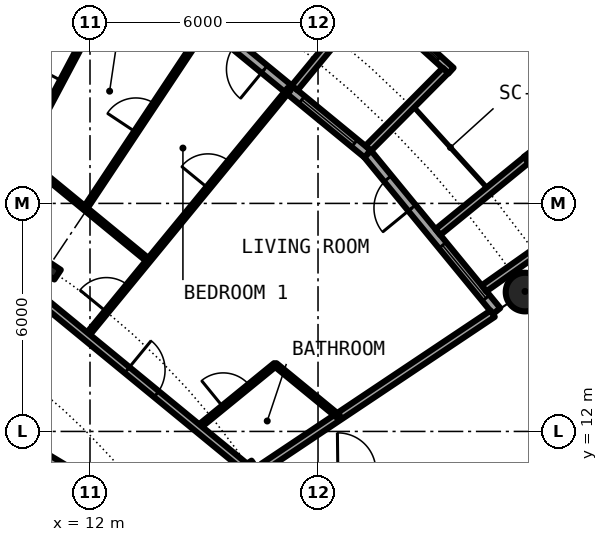
"""IFC4 building model, lengths in metres.
Left out: names, types, materials, properties, quantities, classifications, styles, units other than length and angle.
Written with IfcOpenShell. Run it as: python <this file> out.ifc"""

import sys

from ifc_helpers import new_model, si_unit, direction, frame, frame_2d, origin, origin_2d, place, context, subcontext, project, spatial, rectangle, circle, hollow_circle, i_section, extrude, element, fill, save


model = new_model("IFC4")
c1 = context("Model", 3, precision=1e-05, world=origin(), true_north=direction((0.0, 1.0)))
c2 = subcontext(c1, "Body", "Model", "MODEL_VIEW")
j1 = project(units=[si_unit("LENGTHUNIT", "METRE"), si_unit("PLANEANGLEUNIT", "RADIAN")], contexts=[c1])
p1 = place(None, origin())
s1 = spatial("IfcSite", under=j1, at=p1, CompositionType="ELEMENT")
p2 = place(p1, origin())
s2 = spatial("IfcBuilding", under=s1, at=p2, CompositionType="ELEMENT")
p3 = place(p2, frame((0.0, 0.0, 47.2)))
s3 = spatial("IfcBuildingStorey", under=s2, at=p3, CompositionType="ELEMENT", Elevation=47.2)
p4 = place(p3, frame((23.448, 15.667, 0.0), z_axis=(0.0, 0.0, 1.0), x_axis=(1.0, 0.0, 0.0)))
e1 = element("IfcColumn", 1, at=p4, inside=s3, PredefinedType="COLUMN", context=c2, shape_type="SweptSolid", body=[
    extrude(hollow_circle(Radius=0.508, WallThickness=0.05, at=origin_2d()), origin(), (0.0, 0.0, 1.0), 3.05),
])
for number, where, z_axis, x_axis in (
    (2, (16.297, 10.889, 0.0), (0.0, 0.0, 1.0), (0.831, 0.556, 0.0)),
    (3, (10.889, 16.297, 0.0), (0.0, 0.0, 1.0), (0.556, 0.831, 0.0)),
):
    element("IfcColumn", number, at=place(p3, frame(where, z_axis=z_axis, x_axis=x_axis)), inside=s3, PredefinedType="COLUMN", context=c2, shape_type="SweptSolid", body=[
        extrude(i_section(OverallWidth=0.305, OverallDepth=0.62, WebThickness=0.021, FlangeThickness=0.04, FilletRadius=0.027, at=origin_2d()), origin(), (0.0, 0.0, 1.0), 3.05),
    ])
p5 = place(p3, frame((22.699, 15.167, 0.0), z_axis=(0.0, 0.0, 1.0), x_axis=(-0.634382322723, 0.773019449054, 0.0)))
e4 = element("IfcWall", 4, at=p5, inside=s3, PredefinedType="SOLIDWALL", context=c2, shape_type="SweptSolid", body=[
    extrude(rectangle(XDim=5.352, YDim=0.25, at=frame_2d((2.676, 0.0))), origin(), (0.0, 0.0, 1.0), 2.7),
])
p6 = place(p5, frame((0.441, 0.0, 0.3)))
e5 = element("IfcOpeningElement", 5, at=p6, cuts=e4, PredefinedType="OPENING", context=c2, shape_type="SweptSolid", body=[
    extrude(rectangle(XDim=1.8, YDim=2.1, at=frame_2d((0.9, 1.05))), frame((0.0, 0.135, 0.0), z_axis=(0.0, -1.0, 0.0), x_axis=(1.0, 0.0, 0.0)), (0.0, 0.0, 1.0), 0.27),
])
p7 = place(p5, frame((3.51, 0.0, 0.0)))
e6 = element("IfcOpeningElement", 6, at=p7, cuts=e4, PredefinedType="OPENING", context=c2, shape_type="SweptSolid", body=[
    extrude(rectangle(XDim=1.0, YDim=2.2, at=frame_2d((0.5, 1.1))), frame((0.0, 0.135, 0.0), z_axis=(0.0, -1.0, 0.0), x_axis=(1.0, 0.0, 0.0)), (0.0, 0.0, 1.0), 0.27),
])
p8 = place(p3, frame((24.909, 17.427, -0.03), z_axis=(0.0, 0.0, 1.0), x_axis=(-0.60418752353, 0.796842165306, 0.0)))
e7 = element("IfcWall", 7, at=p8, inside=s3, PredefinedType="SOLIDWALL", context=c2, shape_type="SweptSolid", body=[
    extrude(rectangle(XDim=2.337, YDim=0.2, at=frame_2d((1.168, 0.0))), origin(), (0.0, 0.0, 1.0), 2.73),
])
p9 = place(p8, frame((0.128, 0.0, 0.33)))
e8 = element("IfcOpeningElement", 8, at=p9, cuts=e7, PredefinedType="OPENING", context=c2, shape_type="SweptSolid", body=[
    extrude(circle(Radius=1.04, at=frame_2d((1.04, 1.04))), frame((0.0, 0.11, 0.0), z_axis=(0.0, -1.0, 0.0), x_axis=(1.0, 0.0, 0.0)), (0.0, 0.0, 1.0), 0.22),
])
p10 = place(p3, frame((22.37, 15.765, -0.03), z_axis=(0.0, 0.0, 1.0), x_axis=(0.817256123454, 0.576274612209, 0.0)))
e9 = element("IfcWall", 9, at=p10, inside=s3, PredefinedType="SOLIDWALL", context=c2, shape_type="SweptSolid", body=[
    extrude(rectangle(XDim=2.933, YDim=0.2, at=frame_2d((1.466, 0.0))), origin(), (0.0, 0.0, 1.0), 2.73),
])
p11 = place(p3, frame((21.155, 17.246, -0.03), z_axis=(0.0, 0.0, 1.0), x_axis=(0.775179004516, 0.631741648902, 0.0)))
e10 = element("IfcWall", 10, at=p11, inside=s3, PredefinedType="SOLIDWALL", context=c2, shape_type="SweptSolid", body=[
    extrude(rectangle(XDim=3.006, YDim=0.2, at=frame_2d((1.503, 0.0))), origin(), (0.0, 0.0, 1.0), 2.73),
])
p12 = place(p3, frame((19.304, 19.304, 0.0), z_axis=(0.0, 0.0, 1.0), x_axis=(-0.773019449054, 0.634382322723, 0.0)))
e11 = element("IfcWall", 11, at=p12, inside=s3, PredefinedType="SOLIDWALL", context=c2, shape_type="SweptSolid", body=[
    extrude(rectangle(XDim=5.352, YDim=0.25, at=frame_2d((2.676, 0.0))), origin(), (0.0, 0.0, 1.0), 2.7),
])
p13 = place(p12, frame((0.441, 0.0, 0.3)))
e12 = element("IfcOpeningElement", 12, at=p13, cuts=e11, PredefinedType="OPENING", context=c2, shape_type="SweptSolid", body=[
    extrude(rectangle(XDim=1.8, YDim=2.1, at=frame_2d((0.9, 1.05))), frame((0.0, 0.135, 0.0), z_axis=(0.0, -1.0, 0.0), x_axis=(1.0, 0.0, 0.0)), (0.0, 0.0, 1.0), 0.27),
])
p14 = place(p12, frame((3.51, 0.0, 0.0)))
e13 = element("IfcOpeningElement", 13, at=p14, cuts=e11, PredefinedType="OPENING", context=c2, shape_type="SweptSolid", body=[
    extrude(rectangle(XDim=1.0, YDim=2.2, at=frame_2d((0.5, 1.1))), frame((0.0, 0.135, 0.0), z_axis=(0.0, -1.0, 0.0), x_axis=(1.0, 0.0, 0.0)), (0.0, 0.0, 1.0), 0.27),
])
p15 = place(p3, frame((21.5, 21.493, -0.03), z_axis=(0.0, 0.0, 1.0), x_axis=(-0.740998365753, 0.671506829416, 0.0)))
e14 = element("IfcWall", 14, at=p15, inside=s3, PredefinedType="SOLIDWALL", context=c2, shape_type="SweptSolid", body=[
    extrude(rectangle(XDim=2.993, YDim=0.2, at=frame_2d((1.497, 0.0))), origin(), (0.0, 0.0, 1.0), 2.73),
])
p16 = place(p15, frame((0.457, 0.0, 0.33)))
e15 = element("IfcOpeningElement", 15, at=p16, cuts=e14, PredefinedType="OPENING", context=c2, shape_type="SweptSolid", body=[
    extrude(circle(Radius=1.04, at=frame_2d((1.04, 1.04))), frame((0.0, 0.11, 0.0), z_axis=(0.0, -1.0, 0.0), x_axis=(1.0, 0.0, 0.0)), (0.0, 0.0, 1.0), 0.22),
])
p17 = place(p3, frame((19.323, 19.45, -0.03), z_axis=(0.0, 0.0, 1.0), x_axis=(0.704476739375, 0.709727076896, 0.0)))
e16 = element("IfcWall", 16, at=p17, inside=s3, PredefinedType="SOLIDWALL", context=c2, shape_type="SweptSolid", body=[
    extrude(rectangle(XDim=2.883, YDim=0.2, at=frame_2d((1.441, 0.0))), origin(), (0.0, 0.0, 1.0), 2.73),
])
p18 = place(p3, frame((17.384, 21.041, -0.03), z_axis=(0.0, 0.0, 1.0), x_axis=(0.63709551667, 0.770784861449, 0.0)))
e17 = element("IfcWall", 17, at=p18, inside=s3, PredefinedType="SOLIDWALL", context=c2, shape_type="SweptSolid", body=[
    extrude(rectangle(XDim=3.006, YDim=0.2, at=frame_2d((1.503, 0.0))), origin(), (0.0, 0.0, 1.0), 2.73),
])
p19 = place(p3, frame((10.202, 19.234, 0.0), z_axis=(0.0, 0.0, 1.0), x_axis=(0.468610030042, 0.883405139075, 0.0)))
e18 = element("IfcWall", 18, at=p19, inside=s3, PredefinedType="PARTITIONING", context=c2, shape_type="SweptSolid", body=[
    extrude(rectangle(XDim=5.403, YDim=0.1, at=frame_2d((2.702, 0.0))), origin(), (0.0, 0.0, 1.0), 2.7),
])
p20 = place(p19, frame((2.252, 0.0, 0.0)))
e19 = element("IfcOpeningElement", 19, at=p20, cuts=e18, PredefinedType="OPENING", context=c2, shape_type="SweptSolid", body=[
    extrude(rectangle(XDim=0.9, YDim=2.3, at=frame_2d((0.45, 1.15))), frame((0.0, 0.06, 0.0), z_axis=(0.0, -1.0, 0.0), x_axis=(1.0, 0.0, 0.0)), (0.0, 0.0, 1.0), 0.12),
])
p21 = place(p3, frame((11.87, 17.865, 0.0), z_axis=(0.0, 0.0, 1.0), x_axis=(0.553440102418, 0.832888980018, 0.0)))
e20 = element("IfcWall", 20, at=p21, inside=s3, PredefinedType="PARTITIONING", context=c2, shape_type="SweptSolid", body=[
    extrude(rectangle(XDim=5.726, YDim=0.1, at=frame_2d((2.863, 0.0))), origin(), (0.0, 0.0, 1.0), 2.7),
])
p22 = place(p21, frame((2.413, 0.0, 0.0)))
e21 = element("IfcOpeningElement", 21, at=p22, cuts=e20, PredefinedType="OPENING", context=c2, shape_type="SweptSolid", body=[
    extrude(rectangle(XDim=0.9, YDim=2.3, at=frame_2d((0.45, 1.15))), frame((0.0, 0.06, 0.0), z_axis=(0.0, -1.0, 0.0), x_axis=(1.0, 0.0, 0.0)), (0.0, 0.0, 1.0), 0.12),
])
p23 = place(p3, frame((11.899, 14.499, 0.0), z_axis=(0.0, 0.0, 1.0), x_axis=(0.634396151441, 0.77300810024, 0.0)))
e22 = element("IfcWall", 22, at=p23, inside=s3, PredefinedType="PARTITIONING", context=c2, shape_type="SweptSolid", body=[
    extrude(rectangle(XDim=8.419, YDim=0.1, at=frame_2d((4.209, 0.0))), origin(), (0.0, 0.0, 1.0), 2.7),
])
p24 = place(p23, frame((0.84, 0.0, 0.0)))
e23 = element("IfcOpeningElement", 23, at=p24, cuts=e22, PredefinedType="OPENING", context=c2, shape_type="SweptSolid", body=[
    extrude(rectangle(XDim=0.9, YDim=2.3, at=frame_2d((0.45, 1.15))), frame((0.0, 0.06, 0.0), z_axis=(0.0, -1.0, 0.0), x_axis=(1.0, 0.0, 0.0)), (0.0, 0.0, 1.0), 0.12),
])
p25 = place(p23, frame((5.051, 0.0, 0.0)))
e24 = element("IfcOpeningElement", 24, at=p25, cuts=e22, PredefinedType="OPENING", context=c2, shape_type="SweptSolid", body=[
    extrude(rectangle(XDim=0.9, YDim=2.3, at=frame_2d((0.45, 1.15))), frame((0.0, 0.06, 0.0), z_axis=(0.0, -1.0, 0.0), x_axis=(1.0, 0.0, 0.0)), (0.0, 0.0, 1.0), 0.12),
])
p26 = place(p3, frame((14.831, 12.092, 0.0), z_axis=(0.0, 0.0, 1.0), x_axis=(0.774979608522, 0.631986239072, 0.0)))
e25 = element("IfcWall", 25, at=p26, inside=s3, PredefinedType="PARTITIONING", context=c2, shape_type="SweptSolid", body=[
    extrude(rectangle(XDim=2.636, YDim=0.1, at=frame_2d((1.318, 0.0))), origin(), (0.0, 0.0, 1.0), 2.7),
])
p27 = place(p26, frame((0.868, 0.0, 0.0)))
e26 = element("IfcOpeningElement", 26, at=p27, cuts=e25, PredefinedType="OPENING", context=c2, shape_type="SweptSolid", body=[
    extrude(rectangle(XDim=0.9, YDim=2.3, at=frame_2d((0.45, 1.15))), frame((0.0, 0.06, 0.0), z_axis=(0.0, -1.0, 0.0), x_axis=(1.0, 0.0, 0.0)), (0.0, 0.0, 1.0), 0.12),
])
p28 = place(p3, frame((16.555, 11.061, 0.0), z_axis=(0.0, 0.0, 1.0), x_axis=(0.831403467378, 0.55566921314, 0.0)))
e27 = element("IfcWall", 27, at=p28, inside=s3, PredefinedType="PARTITIONING", context=c2, shape_type="SweptSolid", body=[
    extrude(rectangle(XDim=7.265, YDim=0.2, at=frame_2d((3.632, 0.0))), origin(), (0.0, 0.0, 1.0), 2.7),
])
p29 = place(p3, frame((1.658, 16.819, 0.0), z_axis=(0.0, 0.0, 1.0), x_axis=(0.857688434449, -0.514169767113, 0.0)))
e28 = element("IfcWall", 28, at=p29, inside=s3, PredefinedType="PARTITIONING", context=c2, shape_type="SweptSolid", body=[
    extrude(rectangle(XDim=14.429, YDim=0.2, at=frame_2d((7.215, 0.0))), origin(), (0.0, 0.0, 1.0), 2.7),
])
p30 = place(p29, frame((4.316, 0.0, 0.0)))
e29 = element("IfcOpeningElement", 29, at=p30, cuts=e28, PredefinedType="OPENING", context=c2, shape_type="SweptSolid", body=[
    extrude(rectangle(XDim=1.0, YDim=2.3, at=frame_2d((0.5, 1.15))), frame((0.0, 0.11, 0.0), z_axis=(0.0, -1.0, 0.0), x_axis=(1.0, 0.0, 0.0)), (0.0, 0.0, 1.0), 0.22),
])
p31 = place(p3, frame((7.5, 18.108, 0.0), z_axis=(0.0, 0.0, 1.0), x_axis=(0.773041360816, -0.634355621452, 0.0)))
e30 = element("IfcWall", 30, at=p31, inside=s3, PredefinedType="PARTITIONING", context=c2, shape_type="SweptSolid", body=[
    extrude(rectangle(XDim=11.221, YDim=0.2, at=frame_2d((5.61, 0.0))), origin(), (0.0, 0.0, 1.0), 2.38),
])
p32 = place(p31, frame((7.083, 0.0, 0.0)))
e31 = element("IfcOpeningElement", 31, at=p32, cuts=e30, PredefinedType="OPENING", context=c2, shape_type="SweptSolid", body=[
    extrude(rectangle(XDim=1.0, YDim=2.3, at=frame_2d((0.5, 1.15))), frame((0.0, 0.11, 0.0), z_axis=(0.0, -1.0, 0.0), x_axis=(1.0, 0.0, 0.0)), (0.0, 0.0, 1.0), 0.22),
])
p33 = place(p3, frame((8.534, 20.603, 0.0), z_axis=(0.0, 0.0, 1.0), x_axis=(0.773000340237, -0.634405606843, 0.0)))
e32 = element("IfcWall", 32, at=p33, inside=s3, PredefinedType="PARTITIONING", context=c2, shape_type="SweptSolid", body=[
    extrude(rectangle(XDim=6.474, YDim=0.1, at=frame_2d((3.237, 0.0))), origin(), (0.0, 0.0, 1.0), 2.7),
])
p34 = place(p3, frame((16.874, 13.758, 0.0), z_axis=(0.0, 0.0, 1.0), x_axis=(0.772948171844, -0.634469166818, 0.0)))
e33 = element("IfcWall", 33, at=p34, inside=s3, PredefinedType="PARTITIONING", context=c2, shape_type="SweptSolid", body=[
    extrude(rectangle(XDim=2.158, YDim=0.1, at=frame_2d((1.079, 0.0))), origin(), (0.0, 0.0, 1.0), 2.7),
])
p35 = place(p6, origin())
e34 = element("IfcWindow", 34, at=p35, inside=s3, PartitioningType="SINGLE_PANEL", PredefinedType="WINDOW", context=c2, shape_type="SweptSolid", body=[
    extrude(rectangle(XDim=1.8, YDim=2.1, at=frame_2d((0.9, 1.05))), frame((0.0, 0.03, 0.0), z_axis=(0.0, -1.0, 0.0), x_axis=(1.0, 0.0, 0.0)), (0.0, 0.0, 1.0), 0.06),
])
fill(e5, e34)
p36 = place(p7, origin())
e35 = element("IfcDoor", 35, at=p36, inside=s3, OperationType="SINGLE_SWING_LEFT", PredefinedType="DOOR", context=c2, shape_type="SweptSolid", body=[
    extrude(rectangle(XDim=1.0, YDim=2.2, at=frame_2d((0.5, 1.1))), frame((0.0, 0.025, 0.0), z_axis=(0.0, -1.0, 0.0), x_axis=(1.0, 0.0, 0.0)), (0.0, 0.0, 1.0), 0.05),
])
fill(e6, e35)
p37 = place(p13, origin())
e36 = element("IfcWindow", 36, at=p37, inside=s3, PartitioningType="SINGLE_PANEL", PredefinedType="WINDOW", context=c2, shape_type="SweptSolid", body=[
    extrude(rectangle(XDim=1.8, YDim=2.1, at=frame_2d((0.9, 1.05))), frame((0.0, 0.03, 0.0), z_axis=(0.0, -1.0, 0.0), x_axis=(1.0, 0.0, 0.0)), (0.0, 0.0, 1.0), 0.06),
])
fill(e12, e36)
p38 = place(p16, origin())
e37 = element("IfcWindow", 37, at=p38, inside=s3, PartitioningType="SINGLE_PANEL", PredefinedType="WINDOW", context=c2, shape_type="SweptSolid", body=[
    extrude(circle(Radius=1.04, at=frame_2d((1.04, 1.04))), frame((0.0, 0.03, 0.0), z_axis=(0.0, -1.0, 0.0), x_axis=(1.0, 0.0, 0.0)), (0.0, 0.0, 1.0), 0.06),
])
fill(e15, e37)
p39 = place(p14, origin())
e38 = element("IfcDoor", 38, at=p39, inside=s3, OperationType="SINGLE_SWING_LEFT", PredefinedType="DOOR", context=c2, shape_type="SweptSolid", body=[
    extrude(rectangle(XDim=1.0, YDim=2.2, at=frame_2d((0.5, 1.1))), frame((0.0, 0.025, 0.0), z_axis=(0.0, -1.0, 0.0), x_axis=(1.0, 0.0, 0.0)), (0.0, 0.0, 1.0), 0.05),
])
fill(e13, e38)
p40 = place(p32, origin())
e39 = element("IfcDoor", 39, at=p40, inside=s3, OperationType="SINGLE_SWING_RIGHT", PredefinedType="DOOR", context=c2, shape_type="SweptSolid", body=[
    extrude(rectangle(XDim=1.0, YDim=2.3, at=frame_2d((0.5, 1.15))), frame((0.0, 0.025, 0.0), z_axis=(0.0, -1.0, 0.0), x_axis=(1.0, 0.0, 0.0)), (0.0, 0.0, 1.0), 0.05),
])
fill(e31, e39)
p41 = place(p27, origin())
e40 = element("IfcDoor", 40, at=p41, inside=s3, OperationType="SINGLE_SWING_RIGHT", PredefinedType="DOOR", context=c2, shape_type="SweptSolid", body=[
    extrude(rectangle(XDim=0.9, YDim=2.3, at=frame_2d((0.45, 1.15))), frame((0.0, 0.025, 0.0), z_axis=(0.0, -1.0, 0.0), x_axis=(1.0, 0.0, 0.0)), (0.0, 0.0, 1.0), 0.05),
])
fill(e26, e40)
p42 = place(p24, origin())
e41 = element("IfcDoor", 41, at=p42, inside=s3, OperationType="SINGLE_SWING_LEFT", PredefinedType="DOOR", context=c2, shape_type="SweptSolid", body=[
    extrude(rectangle(XDim=0.9, YDim=2.3, at=frame_2d((0.45, 1.15))), frame((0.0, 0.025, 0.0), z_axis=(0.0, -1.0, 0.0), x_axis=(1.0, 0.0, 0.0)), (0.0, 0.0, 1.0), 0.05),
])
fill(e23, e41)
p43 = place(p25, origin())
e42 = element("IfcDoor", 42, at=p43, inside=s3, OperationType="SINGLE_SWING_RIGHT", PredefinedType="DOOR", context=c2, shape_type="SweptSolid", body=[
    extrude(rectangle(XDim=0.9, YDim=2.3, at=frame_2d((0.45, 1.15))), frame((0.0, 0.025, 0.0), z_axis=(0.0, -1.0, 0.0), x_axis=(1.0, 0.0, 0.0)), (0.0, 0.0, 1.0), 0.05),
])
fill(e24, e42)
p44 = place(p22, origin())
e43 = element("IfcDoor", 43, at=p44, inside=s3, OperationType="SINGLE_SWING_LEFT", PredefinedType="DOOR", context=c2, shape_type="SweptSolid", body=[
    extrude(rectangle(XDim=0.9, YDim=2.3, at=frame_2d((0.45, 1.15))), frame((0.0, 0.025, 0.0), z_axis=(0.0, -1.0, 0.0), x_axis=(1.0, 0.0, 0.0)), (0.0, 0.0, 1.0), 0.05),
])
fill(e21, e43)
p45 = place(p20, origin())
e44 = element("IfcDoor", 44, at=p45, inside=s3, OperationType="SINGLE_SWING_LEFT", PredefinedType="DOOR", context=c2, shape_type="SweptSolid", body=[
    extrude(rectangle(XDim=0.9, YDim=2.3, at=frame_2d((0.45, 1.15))), frame((0.0, 0.025, 0.0), z_axis=(0.0, -1.0, 0.0), x_axis=(1.0, 0.0, 0.0)), (0.0, 0.0, 1.0), 0.05),
])
fill(e19, e44)
save(model, sys.argv[1])
